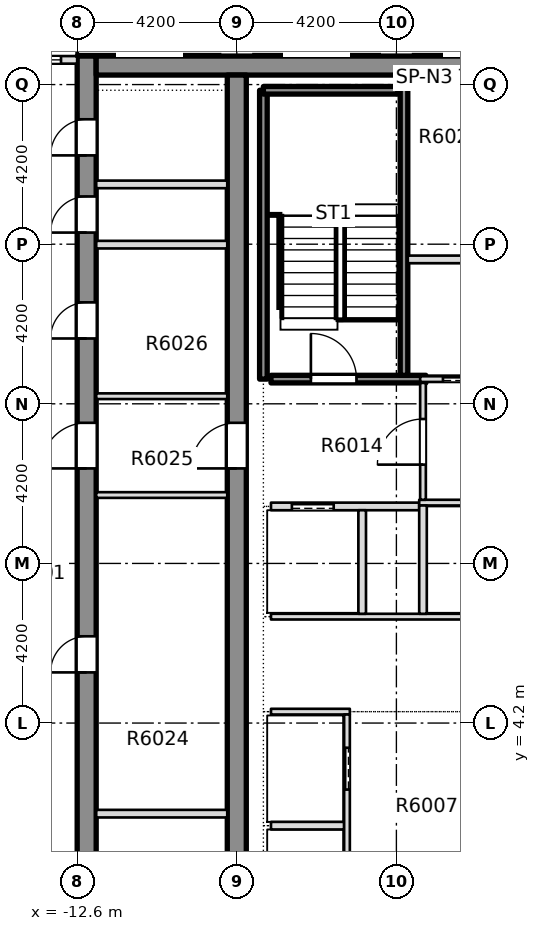
"""IFC4 building model, lengths in metres.
Left out: names, types, materials, properties, quantities, classifications, styles, units other than length and angle.
Written with IfcOpenShell. Run it as: python <this file> out.ifc"""

import sys

from ifc_helpers import new_model, si_unit, direction, frame, frame_2d, origin, place, context, subcontext, project, spatial, rectangle, extrude, element, fill, save


model = new_model("IFC4")
c1 = context("Model", 3, precision=1e-05, world=origin(), true_north=direction((0.0, 1.0)))
c2 = subcontext(c1, "Body", "Model", "MODEL_VIEW")
j1 = project(units=[si_unit("LENGTHUNIT", "METRE"), si_unit("PLANEANGLEUNIT", "RADIAN")], contexts=[c1])
p1 = place(None, origin())
s1 = spatial("IfcSite", under=j1, at=p1, CompositionType="ELEMENT")
p2 = place(p1, origin())
s2 = spatial("IfcBuilding", under=s1, at=p2, CompositionType="ELEMENT")
p3 = place(p2, frame((0.0, 0.0, 230.35)))
s3 = spatial("IfcBuildingStorey", under=s2, at=p3, CompositionType="ELEMENT", Elevation=230.35)
p4 = place(p3, frame((-12.35, -8.4, -0.4), z_axis=(0.0, 0.0, 1.0), x_axis=(0.0, 1.0, 0.0)))
e1 = element("IfcWall", 1, at=p4, inside=s3, PredefinedType="SHEAR", context=c2, shape_type="SweptSolid", body=[
    extrude(rectangle(XDim=30.15, YDim=0.5, at=frame_2d((15.075, 0.0))), origin(), (0.0, 0.0, 1.0), 3.45),
])
p5 = place(p4, frame((5.083, 0.0, 0.4)))
e2 = element("IfcOpeningElement", 2, at=p5, cuts=e1, PredefinedType="OPENING", context=c2, shape_type="SweptSolid", body=[
    extrude(rectangle(XDim=0.95, YDim=2.1, at=frame_2d((0.475, 1.05))), frame((0.0, 0.26, 0.0), z_axis=(0.0, -1.0, 0.0), x_axis=(1.0, 0.0, 0.0)), (0.0, 0.0, 1.0), 0.52),
])
p6 = place(p4, frame((13.933, 0.0, 0.4)))
e3 = element("IfcOpeningElement", 3, at=p6, cuts=e1, PredefinedType="OPENING", context=c2, shape_type="SweptSolid", body=[
    extrude(rectangle(XDim=0.95, YDim=2.1, at=frame_2d((0.475, 1.05))), frame((0.0, 0.26, 0.0), z_axis=(0.0, -1.0, 0.0), x_axis=(1.0, 0.0, 0.0)), (0.0, 0.0, 1.0), 0.52),
])
p7 = place(p4, frame((22.719, 0.0, 0.4)))
e4 = element("IfcOpeningElement", 4, at=p7, cuts=e1, PredefinedType="OPENING", context=c2, shape_type="SweptSolid", body=[
    extrude(rectangle(XDim=0.95, YDim=2.1, at=frame_2d((0.475, 1.05))), frame((0.0, 0.26, 0.0), z_axis=(0.0, -1.0, 0.0), x_axis=(1.0, 0.0, 0.0)), (0.0, 0.0, 1.0), 0.52),
])
p8 = place(p4, frame((25.506, 0.0, 0.4)))
e5 = element("IfcOpeningElement", 5, at=p8, cuts=e1, PredefinedType="OPENING", context=c2, shape_type="SweptSolid", body=[
    extrude(rectangle(XDim=0.95, YDim=2.1, at=frame_2d((0.475, 1.05))), frame((0.0, 0.26, 0.0), z_axis=(0.0, -1.0, 0.0), x_axis=(1.0, 0.0, 0.0)), (0.0, 0.0, 1.0), 0.52),
])
p9 = place(p4, frame((27.537, 0.0, 0.4)))
e6 = element("IfcOpeningElement", 6, at=p9, cuts=e1, PredefinedType="OPENING", context=c2, shape_type="SweptSolid", body=[
    extrude(rectangle(XDim=0.95, YDim=2.1, at=frame_2d((0.475, 1.05))), frame((0.0, 0.26, 0.0), z_axis=(0.0, -1.0, 0.0), x_axis=(1.0, 0.0, 0.0)), (0.0, 0.0, 1.0), 0.52),
])
p10 = place(p4, frame((19.3, 0.0, 0.4)))
e7 = element("IfcOpeningElement", 7, at=p10, cuts=e1, PredefinedType="OPENING", context=c2, shape_type="SweptSolid", body=[
    extrude(rectangle(XDim=1.2, YDim=2.1, at=frame_2d((0.6, 1.05))), frame((0.0, 0.26, 0.0), z_axis=(0.0, -1.0, 0.0), x_axis=(1.0, 0.0, 0.0)), (0.0, 0.0, 1.0), 0.52),
])
p11 = place(p3, frame((-12.1, 21.5, -0.4), z_axis=(0.0, 0.0, 1.0), x_axis=(1.0, 0.0, 0.0)))
e8 = element("IfcWall", 8, at=p11, inside=s3, PredefinedType="SHEAR", context=c2, shape_type="SweptSolid", body=[
    extrude(rectangle(XDim=24.2, YDim=0.5, at=frame_2d((12.1, 0.0))), origin(), (0.0, 0.0, 1.0), 3.45),
])
p12 = place(p3, frame((-8.4, -7.9, -0.4), z_axis=(0.0, 0.0, 1.0), x_axis=(0.0, 1.0, 0.0)))
e9 = element("IfcWall", 9, at=p12, inside=s3, PredefinedType="SHEAR", context=c2, shape_type="SweptSolid", body=[
    extrude(rectangle(XDim=29.15, YDim=0.5, at=frame_2d((14.575, 0.0))), origin(), (0.0, 0.0, 1.0), 3.45),
])
p13 = place(p12, frame((18.8, 0.0, 0.4)))
e10 = element("IfcOpeningElement", 10, at=p13, cuts=e9, PredefinedType="OPENING", context=c2, shape_type="SweptSolid", body=[
    extrude(rectangle(XDim=1.2, YDim=2.1, at=frame_2d((0.6, 1.05))), frame((0.0, 0.26, 0.0), z_axis=(0.0, -1.0, 0.0), x_axis=(1.0, 0.0, 0.0)), (0.0, 0.0, 1.0), 0.52),
])
p14 = place(p3, frame((-12.6, 21.65, 0.0), z_axis=(0.0, 0.0, 1.0), x_axis=(-1.0, 0.0, 0.0)))
e11 = element("IfcWall", 11, at=p14, inside=s3, PredefinedType="STANDARD", context=c2, shape_type="SweptSolid", body=[
    extrude(rectangle(XDim=3.75, YDim=0.2, at=frame_2d((1.875, 0.0))), origin(), (0.0, 0.0, 1.0), 3.05),
])
p15 = place(p14, frame((0.425, 0.0, 0.2)))
e12 = element("IfcOpeningElement", 12, at=p15, cuts=e11, PredefinedType="OPENING", context=c2, shape_type="SweptSolid", body=[
    extrude(rectangle(XDim=1.8, YDim=2.65, at=frame_2d((0.9, 1.325))), frame((0.0, 0.11, 0.0), z_axis=(0.0, -1.0, 0.0), x_axis=(1.0, 0.0, 0.0)), (0.0, 0.0, 1.0), 0.22),
])
p16 = place(p14, frame((2.325, 0.0, 0.0)))
e13 = element("IfcOpeningElement", 13, at=p16, cuts=e11, PredefinedType="OPENING", context=c2, shape_type="SweptSolid", body=[
    extrude(rectangle(XDim=1.0, YDim=2.4, at=frame_2d((0.5, 1.2))), frame((0.0, 0.11, 0.0), z_axis=(0.0, -1.0, 0.0), x_axis=(1.0, 0.0, 0.0)), (0.0, 0.0, 1.0), 0.22),
])
p17 = place(p3, frame((-7.5, 1.5, 0.0), z_axis=(0.0, 0.0, 1.0), x_axis=(1.0, 0.0, 0.0)))
e14 = element("IfcWall", 14, at=p17, inside=s3, PredefinedType="PARTITIONING", context=c2, shape_type="SweptSolid", body=[
    extrude(rectangle(XDim=1.925, YDim=0.2, at=frame_2d((0.962, 0.0))), origin(), (0.0, 0.0, 1.0), 3.05),
])
p18 = place(p3, frame((-7.5, 4.5, 0.0), z_axis=(0.0, 0.0, 1.0), x_axis=(1.0, 0.0, 0.0)))
e15 = element("IfcWall", 15, at=p18, inside=s3, PredefinedType="PARTITIONING", context=c2, shape_type="SweptSolid", body=[
    extrude(rectangle(XDim=2.075, YDim=0.15, at=frame_2d((1.038, 0.0))), origin(), (0.0, 0.0, 1.0), 3.05),
])
p19 = place(p3, frame((-7.5, 7.0, 0.0), z_axis=(0.0, 0.0, 1.0), x_axis=(1.0, 0.0, 0.0)))
e16 = element("IfcWall", 16, at=p19, inside=s3, PredefinedType="PARTITIONING", context=c2, shape_type="SweptSolid", body=[
    extrude(rectangle(XDim=15.0, YDim=0.15, at=frame_2d((7.5, 0.0))), origin(), (0.0, 0.0, 1.0), 3.05),
])
p20 = place(p19, frame((6.8, 0.0, 0.0)))
e17 = element("IfcOpeningElement", 17, at=p20, cuts=e16, PredefinedType="OPENING", context=c2, shape_type="SweptSolid", body=[
    extrude(rectangle(XDim=1.4, YDim=2.1, at=frame_2d((0.7, 1.05))), frame((0.0, 0.085, 0.0), z_axis=(0.0, -1.0, 0.0), x_axis=(1.0, 0.0, 0.0)), (0.0, 0.0, 1.0), 0.17),
])
p21 = place(p3, frame((-7.5, 9.9, 0.0), z_axis=(0.0, 0.0, 1.0), x_axis=(1.0, 0.0, 0.0)))
e18 = element("IfcWall", 18, at=p21, inside=s3, PredefinedType="PARTITIONING", context=c2, shape_type="SweptSolid", body=[
    extrude(rectangle(XDim=3.9, YDim=0.2, at=frame_2d((1.95, 0.0))), origin(), (0.0, 0.0, 1.0), 3.05),
])
p22 = place(p21, frame((0.55, 0.0, 0.0)))
e19 = element("IfcOpeningElement", 19, at=p22, cuts=e18, PredefinedType="OPENING", context=c2, shape_type="SweptSolid", body=[
    extrude(rectangle(XDim=1.1, YDim=2.1, at=frame_2d((0.55, 1.05))), frame((0.0, 0.11, 0.0), z_axis=(0.0, -1.0, 0.0), x_axis=(1.0, 0.0, 0.0)), (0.0, 0.0, 1.0), 0.22),
])
p23 = place(p3, frame((-3.6, 10.0, 0.0), z_axis=(0.0, 0.0, 1.0), x_axis=(1.0, 0.0, 0.0)))
e20 = element("IfcWall", 20, at=p23, inside=s3, PredefinedType="PARTITIONING", context=c2, shape_type="SweptSolid", body=[
    extrude(rectangle(XDim=7.2, YDim=0.15, at=frame_2d((3.6, 0.0))), origin(), (0.0, 0.0, 1.0), 3.05),
])
p24 = place(p23, frame((2.9, 0.0, 0.0)))
e21 = element("IfcOpeningElement", 21, at=p24, cuts=e20, PredefinedType="OPENING", context=c2, shape_type="SweptSolid", body=[
    extrude(rectangle(XDim=1.4, YDim=2.1, at=frame_2d((0.7, 1.05))), frame((0.0, 0.085, 0.0), z_axis=(0.0, -1.0, 0.0), x_axis=(1.0, 0.0, 0.0)), (0.0, 0.0, 1.0), 0.17),
])
p25 = place(p3, frame((-7.5, 13.25, 0.0), z_axis=(0.0, 0.0, 1.0), x_axis=(1.0, 0.0, 0.0)))
e22 = element("IfcWall", 22, at=p25, inside=s3, PredefinedType="SOLIDWALL", context=c2, shape_type="SweptSolid", body=[
    extrude(rectangle(XDim=4.075, YDim=0.2, at=frame_2d((2.038, 0.0))), origin(), (0.0, 0.0, 1.0), 3.05),
])
p26 = place(p25, frame((1.05, 0.0, 0.0)))
e23 = element("IfcOpeningElement", 23, at=p26, cuts=e22, PredefinedType="OPENING", context=c2, shape_type="SweptSolid", body=[
    extrude(rectangle(XDim=1.2, YDim=2.1, at=frame_2d((0.6, 1.05))), frame((0.0, 0.11, 0.0), z_axis=(0.0, -1.0, 0.0), x_axis=(1.0, 0.0, 0.0)), (0.0, 0.0, 1.0), 0.22),
])
p27 = place(p3, frame((-3.575, 13.25, 0.0), z_axis=(0.0, 0.0, 1.0), x_axis=(1.0, 0.0, 0.0)))
e24 = element("IfcWall", 24, at=p27, inside=s3, PredefinedType="PARTITIONING", context=c2, shape_type="SweptSolid", body=[
    extrude(rectangle(XDim=7.15, YDim=0.15, at=frame_2d((3.575, 0.0))), origin(), (0.0, 0.0, 1.0), 3.05),
])
p28 = place(p27, frame((0.6, 0.0, 0.0)))
e25 = element("IfcOpeningElement", 25, at=p28, cuts=e24, PredefinedType="OPENING", context=c2, shape_type="SweptSolid", body=[
    extrude(rectangle(XDim=1.2, YDim=2.1, at=frame_2d((0.6, 1.05))), frame((0.0, 0.085, 0.0), z_axis=(0.0, -1.0, 0.0), x_axis=(1.0, 0.0, 0.0)), (0.0, 0.0, 1.0), 0.17),
])
p29 = place(p27, frame((5.4, 0.0, 0.0)))
e26 = element("IfcOpeningElement", 26, at=p29, cuts=e24, PredefinedType="OPENING", context=c2, shape_type="SweptSolid", body=[
    extrude(rectangle(XDim=1.1, YDim=2.1, at=frame_2d((0.55, 1.05))), frame((0.0, 0.085, 0.0), z_axis=(0.0, -1.0, 0.0), x_axis=(1.0, 0.0, 0.0)), (0.0, 0.0, 1.0), 0.17),
])
p30 = place(p27, frame((2.975, 0.0, 0.0)))
e27 = element("IfcOpeningElement", 27, at=p30, cuts=e24, PredefinedType="OPENING", context=c2, shape_type="SweptSolid", body=[
    extrude(rectangle(XDim=1.2, YDim=2.1, at=frame_2d((0.6, 1.05))), frame((0.0, 0.085, 0.0), z_axis=(0.0, -1.0, 0.0), x_axis=(1.0, 0.0, 0.0)), (0.0, 0.0, 1.0), 0.17),
])
p31 = place(p3, frame((-3.9, 16.4, 0.0), z_axis=(0.0, 0.0, 1.0), x_axis=(1.0, 0.0, 0.0)))
e28 = element("IfcWall", 28, at=p31, inside=s3, PredefinedType="PARTITIONING", context=c2, shape_type="SweptSolid", body=[
    extrude(rectangle(XDim=3.05, YDim=0.2, at=frame_2d((1.525, 0.0))), origin(), (0.0, 0.0, 1.0), 3.05),
])
p32 = place(p3, frame((-5.5, -7.899, 0.0), z_axis=(0.0, 0.0, 1.0), x_axis=(0.0, 1.0, 0.0)))
e29 = element("IfcWall", 29, at=p32, inside=s3, PredefinedType="PARTITIONING", context=c2, shape_type="SweptSolid", body=[
    extrude(rectangle(XDim=12.324, YDim=0.15, at=frame_2d((6.162, 0.0))), origin(), (0.0, 0.0, 1.0), 3.05),
])
p33 = place(p32, frame((1.349, 0.0, 0.0)))
e30 = element("IfcOpeningElement", 30, at=p33, cuts=e29, PredefinedType="OPENING", context=c2, shape_type="SweptSolid", body=[
    extrude(rectangle(XDim=1.1, YDim=2.1, at=frame_2d((0.55, 1.05))), frame((0.0, 0.085, 0.0), z_axis=(0.0, -1.0, 0.0), x_axis=(1.0, 0.0, 0.0)), (0.0, 0.0, 1.0), 0.17),
])
p34 = place(p32, frame((4.349, 0.0, 0.0)))
e31 = element("IfcOpeningElement", 31, at=p34, cuts=e29, PredefinedType="OPENING", context=c2, shape_type="SweptSolid", body=[
    extrude(rectangle(XDim=1.1, YDim=2.1, at=frame_2d((0.55, 1.05))), frame((0.0, 0.085, 0.0), z_axis=(0.0, -1.0, 0.0), x_axis=(1.0, 0.0, 0.0)), (0.0, 0.0, 1.0), 0.17),
])
p35 = place(p32, frame((7.349, 0.0, 0.0)))
e32 = element("IfcOpeningElement", 32, at=p35, cuts=e29, PredefinedType="OPENING", context=c2, shape_type="SweptSolid", body=[
    extrude(rectangle(XDim=1.1, YDim=2.1, at=frame_2d((0.55, 1.05))), frame((0.0, 0.085, 0.0), z_axis=(0.0, -1.0, 0.0), x_axis=(1.0, 0.0, 0.0)), (0.0, 0.0, 1.0), 0.17),
])
p36 = place(p32, frame((10.349, 0.0, 0.0)))
e33 = element("IfcOpeningElement", 33, at=p36, cuts=e29, PredefinedType="OPENING", context=c2, shape_type="SweptSolid", body=[
    extrude(rectangle(XDim=1.1, YDim=2.1, at=frame_2d((0.55, 1.05))), frame((0.0, 0.085, 0.0), z_axis=(0.0, -1.0, 0.0), x_axis=(1.0, 0.0, 0.0)), (0.0, 0.0, 1.0), 0.17),
])
p37 = place(p3, frame((-5.1, 7.075, 0.0), z_axis=(0.0, 0.0, 1.0), x_axis=(0.0, 1.0, 0.0)))
e34 = element("IfcWall", 34, at=p37, inside=s3, PredefinedType="PARTITIONING", context=c2, shape_type="SweptSolid", body=[
    extrude(rectangle(XDim=2.725, YDim=0.2, at=frame_2d((1.363, 0.0))), origin(), (0.0, 0.0, 1.0), 3.05),
])
p38 = place(p3, frame((-4.0, 13.35, 0.0), z_axis=(0.0, 0.0, 1.0), x_axis=(0.0, 1.0, 0.0)))
e35 = element("IfcWall", 35, at=p38, inside=s3, PredefinedType="SOLIDWALL", context=c2, shape_type="SweptSolid", body=[
    extrude(rectangle(XDim=7.899, YDim=0.2, at=frame_2d((3.949, 0.0))), origin(), (0.0, 0.0, 1.0), 3.05),
])
p39 = place(p3, frame((-3.5, 7.075, 0.0), z_axis=(0.0, 0.0, 1.0), x_axis=(0.0, 1.0, 0.0)))
e36 = element("IfcWall", 36, at=p39, inside=s3, PredefinedType="PARTITIONING", context=c2, shape_type="SweptSolid", body=[
    extrude(rectangle(XDim=2.85, YDim=0.2, at=frame_2d((1.425, 0.0))), origin(), (0.0, 0.0, 1.0), 3.05),
])
p40 = place(p3, frame((-3.5, 10.075, 0.0), z_axis=(0.0, 0.0, 1.0), x_axis=(0.0, 1.0, 0.0)))
e37 = element("IfcWall", 37, at=p40, inside=s3, PredefinedType="PARTITIONING", context=c2, shape_type="SweptSolid", body=[
    extrude(rectangle(XDim=3.075, YDim=0.15, at=frame_2d((1.538, 0.0))), origin(), (0.0, 0.0, 1.0), 3.05),
])
p41 = place(p40, frame((0.925, 0.0, 0.0)))
e38 = element("IfcOpeningElement", 38, at=p41, cuts=e37, PredefinedType="OPENING", context=c2, shape_type="SweptSolid", body=[
    extrude(rectangle(XDim=1.2, YDim=2.1, at=frame_2d((0.6, 1.05))), frame((0.0, 0.085, 0.0), z_axis=(0.0, -1.0, 0.0), x_axis=(1.0, 0.0, 0.0)), (0.0, 0.0, 1.0), 0.17),
])
p42 = place(p3, frame((-12.099, 1.816, 0.0), z_axis=(0.0, 0.0, 1.0), x_axis=(1.0, 0.0, 0.0)))
e39 = element("IfcWall", 39, at=p42, inside=s3, PredefinedType="PARTITIONING", context=c2, shape_type="SweptSolid", body=[
    extrude(rectangle(XDim=3.448, YDim=0.2, at=frame_2d((1.724, 0.0))), origin(), (0.0, 0.0, 1.0), 3.05),
])
for number, where, z_axis, x_axis in (
    (40, (-12.099, 10.2, 0.0), (0.0, 0.0, 1.0), (1.0, 0.0, 0.0)),
    (41, (-12.099, 12.8, 0.0), (0.0, 0.0, 1.0), (1.0, 0.0, 0.0)),
):
    element("IfcWall", number, at=place(p3, frame(where, z_axis=z_axis, x_axis=x_axis)), inside=s3, PredefinedType="PARTITIONING", context=c2, shape_type="SweptSolid", body=[
        extrude(rectangle(XDim=3.448, YDim=0.15, at=frame_2d((1.724, 0.0))), origin(), (0.0, 0.0, 1.0), 3.05),
    ])
for number, where, z_axis, x_axis in (
    (42, (-12.099, 16.788, 0.0), (0.0, 0.0, 1.0), (1.0, 0.0, 0.0)),
    (43, (-12.099, 18.373, 0.0), (0.0, 0.0, 1.0), (1.0, 0.0, 0.0)),
):
    element("IfcWall", number, at=place(p3, frame(where, z_axis=z_axis, x_axis=x_axis)), inside=s3, PredefinedType="PARTITIONING", context=c2, shape_type="SweptSolid", body=[
        extrude(rectangle(XDim=3.448, YDim=0.2, at=frame_2d((1.724, 0.0))), origin(), (0.0, 0.0, 1.0), 3.05),
    ])
p43 = place(p3, frame((-7.7, 13.25, 0.0), z_axis=(0.0, 0.0, 1.0), x_axis=(0.0, 1.0, 0.0)))
e44 = element("IfcWall", 44, at=p43, inside=s3, PredefinedType="SOLIDWALL", context=c2, shape_type="SweptSolid", body=[
    extrude(rectangle(XDim=7.6, YDim=0.2, at=frame_2d((3.8, 0.0))), origin(), (0.0, 0.0, 1.0), 3.05),
])
p44 = place(p3, frame((-7.7, 20.85, 0.0), z_axis=(0.0, 0.0, 1.0), x_axis=(1.0, 0.0, 0.0)))
e45 = element("IfcWall", 45, at=p44, inside=s3, PredefinedType="SOLIDWALL", context=c2, shape_type="SweptSolid", body=[
    extrude(rectangle(XDim=3.55, YDim=0.2, at=frame_2d((1.775, 0.0))), origin(), (0.0, 0.0, 1.0), 3.05),
])
p45 = place(p15, origin())
e46 = element("IfcWindow", 46, at=p45, inside=s3, PartitioningType="SINGLE_PANEL", PredefinedType="WINDOW", context=c2, shape_type="SweptSolid", body=[
    extrude(rectangle(XDim=1.8, YDim=2.65, at=frame_2d((0.9, 1.325))), frame((0.0, 0.03, 0.0), z_axis=(0.0, -1.0, 0.0), x_axis=(1.0, 0.0, 0.0)), (0.0, 0.0, 1.0), 0.06),
])
fill(e12, e46)
p46 = place(p36, origin())
e47 = element("IfcDoor", 47, at=p46, inside=s3, OperationType="SLIDING_TO_LEFT", PredefinedType="DOOR", context=c2, shape_type="SweptSolid", body=[
    extrude(rectangle(XDim=1.1, YDim=2.1, at=frame_2d((0.55, 1.05))), frame((0.0, 0.025, 0.0), z_axis=(0.0, -1.0, 0.0), x_axis=(1.0, 0.0, 0.0)), (0.0, 0.0, 1.0), 0.05),
])
fill(e33, e47)
p47 = place(p26, origin())
e48 = element("IfcDoor", 48, at=p47, inside=s3, OperationType="SINGLE_SWING_LEFT", PredefinedType="DOOR", context=c2, shape_type="SweptSolid", body=[
    extrude(rectangle(XDim=1.2, YDim=2.1, at=frame_2d((0.6, 1.05))), frame((0.0, 0.025, 0.0), z_axis=(0.0, -1.0, 0.0), x_axis=(1.0, 0.0, 0.0)), (0.0, 0.0, 1.0), 0.05),
])
fill(e23, e48)
p48 = place(p22, origin())
e49 = element("IfcDoor", 49, at=p48, inside=s3, OperationType="SLIDING_TO_RIGHT", PredefinedType="DOOR", context=c2, shape_type="SweptSolid", body=[
    extrude(rectangle(XDim=1.1, YDim=2.1, at=frame_2d((0.55, 1.05))), frame((0.0, 0.025, 0.0), z_axis=(0.0, -1.0, 0.0), x_axis=(1.0, 0.0, 0.0)), (0.0, 0.0, 1.0), 0.05),
])
fill(e19, e49)
p49 = place(p28, origin())
e50 = element("IfcDoor", 50, at=p49, inside=s3, OperationType="SLIDING_TO_RIGHT", PredefinedType="DOOR", context=c2, shape_type="SweptSolid", body=[
    extrude(rectangle(XDim=1.2, YDim=2.1, at=frame_2d((0.6, 1.05))), frame((0.0, 0.025, 0.0), z_axis=(0.0, -1.0, 0.0), x_axis=(1.0, 0.0, 0.0)), (0.0, 0.0, 1.0), 0.05),
])
fill(e25, e50)
p50 = place(p41, origin())
e51 = element("IfcDoor", 51, at=p50, inside=s3, OperationType="SINGLE_SWING_RIGHT", PredefinedType="DOOR", context=c2, shape_type="SweptSolid", body=[
    extrude(rectangle(XDim=1.2, YDim=2.1, at=frame_2d((0.6, 1.05))), frame((0.0, 0.025, 0.0), z_axis=(0.0, -1.0, 0.0), x_axis=(1.0, 0.0, 0.0)), (0.0, 0.0, 1.0), 0.05),
])
fill(e38, e51)
p51 = place(p6, origin())
e52 = element("IfcDoor", 52, at=p51, inside=s3, OperationType="SINGLE_SWING_LEFT", PredefinedType="DOOR", context=c2, shape_type="SweptSolid", body=[
    extrude(rectangle(XDim=0.95, YDim=2.1, at=frame_2d((0.475, 1.05))), frame((0.0, 0.025, 0.0), z_axis=(0.0, -1.0, 0.0), x_axis=(1.0, 0.0, 0.0)), (0.0, 0.0, 1.0), 0.05),
])
fill(e3, e52)
p52 = place(p7, origin())
e53 = element("IfcDoor", 53, at=p52, inside=s3, OperationType="SINGLE_SWING_LEFT", PredefinedType="DOOR", context=c2, shape_type="SweptSolid", body=[
    extrude(rectangle(XDim=0.95, YDim=2.1, at=frame_2d((0.475, 1.05))), frame((0.0, 0.025, 0.0), z_axis=(0.0, -1.0, 0.0), x_axis=(1.0, 0.0, 0.0)), (0.0, 0.0, 1.0), 0.05),
])
fill(e4, e53)
p53 = place(p8, origin())
e54 = element("IfcDoor", 54, at=p53, inside=s3, OperationType="SINGLE_SWING_LEFT", PredefinedType="DOOR", context=c2, shape_type="SweptSolid", body=[
    extrude(rectangle(XDim=0.95, YDim=2.1, at=frame_2d((0.475, 1.05))), frame((0.0, 0.025, 0.0), z_axis=(0.0, -1.0, 0.0), x_axis=(1.0, 0.0, 0.0)), (0.0, 0.0, 1.0), 0.05),
])
fill(e5, e54)
p54 = place(p9, origin())
e55 = element("IfcDoor", 55, at=p54, inside=s3, OperationType="SINGLE_SWING_LEFT", PredefinedType="DOOR", context=c2, shape_type="SweptSolid", body=[
    extrude(rectangle(XDim=0.95, YDim=2.1, at=frame_2d((0.475, 1.05))), frame((0.0, 0.025, 0.0), z_axis=(0.0, -1.0, 0.0), x_axis=(1.0, 0.0, 0.0)), (0.0, 0.0, 1.0), 0.05),
])
fill(e6, e55)
p55 = place(p10, origin())
e56 = element("IfcDoor", 56, at=p55, inside=s3, OperationType="SINGLE_SWING_LEFT", PredefinedType="DOOR", context=c2, shape_type="SweptSolid", body=[
    extrude(rectangle(XDim=1.2, YDim=2.1, at=frame_2d((0.6, 1.05))), frame((0.0, 0.025, 0.0), z_axis=(0.0, -1.0, 0.0), x_axis=(1.0, 0.0, 0.0)), (0.0, 0.0, 1.0), 0.05),
])
fill(e7, e56)
p56 = place(p13, origin())
e57 = element("IfcDoor", 57, at=p56, inside=s3, OperationType="SINGLE_SWING_LEFT", PredefinedType="DOOR", context=c2, shape_type="SweptSolid", body=[
    extrude(rectangle(XDim=1.2, YDim=2.1, at=frame_2d((0.6, 1.05))), frame((0.0, 0.025, 0.0), z_axis=(0.0, -1.0, 0.0), x_axis=(1.0, 0.0, 0.0)), (0.0, 0.0, 1.0), 0.05),
])
fill(e10, e57)
save(model, sys.argv[1])
